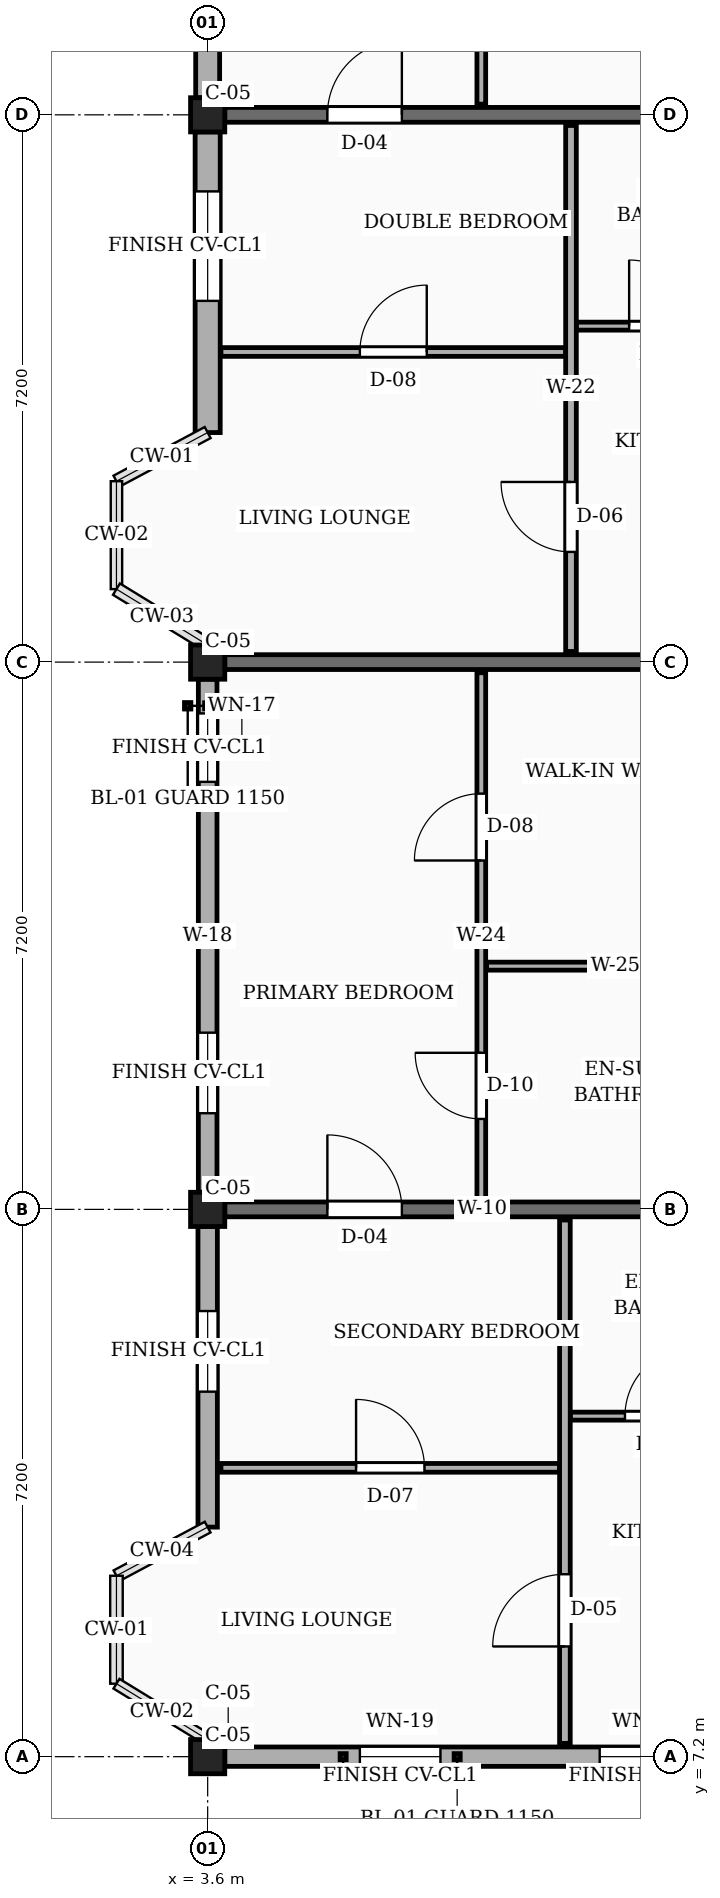
"""IFC4 building model, lengths in metres.
Left out: names, types, materials, properties, quantities, classifications, styles, units other than length and angle.
Written with IfcOpenShell. Run it as: python <this file> out.ifc"""

import sys

from ifc_helpers import new_model, si_unit, direction, frame, frame_2d, origin, origin_2d, place, context, subcontext, project, spatial, rectangle, extrude, element, fill, save


model = new_model("IFC4")
c1 = context("Model", 3, precision=1e-05, world=origin(), true_north=direction((0.0, 1.0)))
c2 = subcontext(c1, "Body", "Model", "MODEL_VIEW")
j1 = project(units=[si_unit("LENGTHUNIT", "METRE"), si_unit("PLANEANGLEUNIT", "RADIAN")], contexts=[c1])
p1 = place(None, origin())
s1 = spatial("IfcSite", under=j1, at=p1, CompositionType="ELEMENT")
p2 = place(p1, origin())
s2 = spatial("IfcBuilding", under=s1, at=p2, CompositionType="ELEMENT")
p3 = place(p2, frame((0.0, 0.0, 39.15)))
s3 = spatial("IfcBuildingStorey", under=s2, at=p3, CompositionType="ELEMENT", Elevation=39.15)
for number, where, z_axis, x_axis in (
    (1, (3.6, 7.2, 0.0), (0.0, 0.0, 1.0), (1.0, 0.0, 0.0)),
    (2, (3.6, 14.4, 0.0), (0.0, 0.0, 1.0), (1.0, 0.0, 0.0)),
    (3, (3.6, 21.6, 0.0), (0.0, 0.0, 1.0), (1.0, 0.0, 0.0)),
    (4, (3.6, 28.8, 0.0), (0.0, 0.0, 1.0), (1.0, 0.0, 0.0)),
):
    element("IfcColumn", number, at=place(p3, frame(where, z_axis=z_axis, x_axis=x_axis)), inside=s3, PredefinedType="COLUMN", context=c2, shape_type="SweptSolid", body=[
        extrude(rectangle(XDim=0.45, YDim=0.45, at=origin_2d()), origin(), (0.0, 0.0, 1.0), 3.15),
    ])
p4 = place(p3, frame((3.825, 14.4, 0.0), z_axis=(0.0, 0.0, 1.0), x_axis=(1.0, 0.0, 0.0)))
e5 = element("IfcWall", 5, at=p4, inside=s3, PredefinedType="SOLIDWALL", context=c2, shape_type="SweptSolid", body=[
    extrude(rectangle(XDim=6.775, YDim=0.195, at=frame_2d((3.388, 0.0))), origin(), (0.0, 0.0, 1.0), 2.17),
])
p5 = place(p4, frame((1.35, 0.0, 0.0)))
e6 = element("IfcOpeningElement", 6, at=p5, cuts=e5, PredefinedType="OPENING", context=c2, shape_type="SweptSolid", body=[
    extrude(rectangle(XDim=0.98, YDim=2.12, at=frame_2d((0.49, 1.06))), frame((0.0, 0.107, 0.0), z_axis=(0.0, -1.0, 0.0), x_axis=(1.0, 0.0, 0.0)), (0.0, 0.0, 1.0), 0.215),
])
p6 = place(p3, frame((3.825, 21.6, 0.0), z_axis=(0.0, 0.0, 1.0), x_axis=(1.0, 0.0, 0.0)))
e7 = element("IfcWall", 7, at=p6, inside=s3, PredefinedType="SOLIDWALL", context=c2, shape_type="SweptSolid", body=[
    extrude(rectangle(XDim=6.775, YDim=0.195, at=frame_2d((3.388, 0.0))), origin(), (0.0, 0.0, 1.0), 2.17),
])
p7 = place(p3, frame((3.825, 28.8, 0.0), z_axis=(0.0, 0.0, 1.0), x_axis=(1.0, 0.0, 0.0)))
e8 = element("IfcWall", 8, at=p7, inside=s3, PredefinedType="SOLIDWALL", context=c2, shape_type="SweptSolid", body=[
    extrude(rectangle(XDim=6.775, YDim=0.195, at=frame_2d((3.388, 0.0))), origin(), (0.0, 0.0, 1.0), 2.17),
])
p8 = place(p7, frame((1.35, 0.0, 0.0)))
e9 = element("IfcOpeningElement", 9, at=p8, cuts=e8, PredefinedType="OPENING", context=c2, shape_type="SweptSolid", body=[
    extrude(rectangle(XDim=0.98, YDim=2.12, at=frame_2d((0.49, 1.06))), frame((0.0, 0.107, 0.0), z_axis=(0.0, -1.0, 0.0), x_axis=(1.0, 0.0, 0.0)), (0.0, 0.0, 1.0), 0.215),
])
p9 = place(p3, frame((3.825, 7.2, 0.0), z_axis=(0.0, 0.0, 1.0), x_axis=(1.0, 0.0, 0.0)))
e10 = element("IfcWall", 10, at=p9, inside=s3, PredefinedType="SOLIDWALL", context=c2, shape_type="SweptSolid", body=[
    extrude(rectangle(XDim=6.75, YDim=0.255, at=frame_2d((3.375, 0.0))), origin(), (0.0, 0.0, 1.0), 2.44),
])
p10 = place(p9, frame((1.778, 0.0, 0.78)))
e11 = element("IfcOpeningElement", 11, at=p10, cuts=e10, PredefinedType="OPENING", context=c2, shape_type="SweptSolid", body=[
    extrude(rectangle(XDim=1.06, YDim=1.36, at=frame_2d((0.53, 0.68))), frame((0.0, 0.137, 0.0), z_axis=(0.0, -1.0, 0.0), x_axis=(1.0, 0.0, 0.0)), (0.0, 0.0, 1.0), 0.275),
])
p11 = place(p9, frame((4.933, 0.0, 0.78)))
e12 = element("IfcOpeningElement", 12, at=p11, cuts=e10, PredefinedType="OPENING", context=c2, shape_type="SweptSolid", body=[
    extrude(rectangle(XDim=1.22, YDim=1.36, at=frame_2d((0.61, 0.68))), frame((0.0, 0.137, 0.0), z_axis=(0.0, -1.0, 0.0), x_axis=(1.0, 0.0, 0.0)), (0.0, 0.0, 1.0), 0.275),
])
p12 = place(p3, frame((3.6, 35.775, 0.0), z_axis=(0.0, 0.0, 1.0), x_axis=(0.0, -1.0, 0.0)))
e13 = element("IfcWall", 13, at=p12, inside=s3, PredefinedType="SOLIDWALL", context=c2, shape_type="SweptSolid", body=[
    extrude(rectangle(XDim=6.75, YDim=0.315, at=frame_2d((3.375, 0.0))), origin(), (0.0, 0.0, 1.0), 2.44),
])
p13 = place(p12, frame((0.45, 0.0, 0.78)))
e14 = element("IfcOpeningElement", 14, at=p13, cuts=e13, PredefinedType="OPENING", context=c2, shape_type="SweptSolid", body=[
    extrude(rectangle(XDim=1.28, YDim=1.26, at=frame_2d((0.64, 0.63))), frame((0.0, 0.167, 0.0), z_axis=(0.0, -1.0, 0.0), x_axis=(1.0, 0.0, 0.0)), (0.0, 0.0, 1.0), 0.335),
])
p14 = place(p12, frame((4.65, 0.0, 0.78)))
e15 = element("IfcOpeningElement", 15, at=p14, cuts=e13, PredefinedType="OPENING", context=c2, shape_type="SweptSolid", body=[
    extrude(rectangle(XDim=1.44, YDim=1.26, at=frame_2d((0.72, 0.63))), frame((0.0, 0.167, 0.0), z_axis=(0.0, -1.0, 0.0), x_axis=(1.0, 0.0, 0.0)), (0.0, 0.0, 1.0), 0.335),
])
p15 = place(p3, frame((3.6, 28.575, 0.0), z_axis=(0.0, 0.0, 1.0), x_axis=(0.0, -1.0, 0.0)))
e16 = element("IfcWall", 16, at=p15, inside=s3, PredefinedType="SOLIDWALL", context=c2, shape_type="SweptSolid", body=[
    extrude(rectangle(XDim=3.955, YDim=0.33, at=frame_2d((1.978, 0.0))), origin(), (0.0, 0.0, 1.0), 2.44),
])
p16 = place(p15, frame((0.782, 0.0, 0.78)))
e17 = element("IfcOpeningElement", 17, at=p16, cuts=e16, PredefinedType="OPENING", context=c2, shape_type="SweptSolid", body=[
    extrude(rectangle(XDim=1.44, YDim=1.26, at=frame_2d((0.72, 0.63))), frame((0.0, 0.175, 0.0), z_axis=(0.0, -1.0, 0.0), x_axis=(1.0, 0.0, 0.0)), (0.0, 0.0, 1.0), 0.35),
])
p17 = place(p3, frame((3.6, 21.375, 0.0), z_axis=(0.0, 0.0, 1.0), x_axis=(0.0, -1.0, 0.0)))
e18 = element("IfcWall", 18, at=p17, inside=s3, PredefinedType="SOLIDWALL", context=c2, shape_type="SweptSolid", body=[
    extrude(rectangle(XDim=6.75, YDim=0.245, at=frame_2d((3.375, 0.0))), origin(), (0.0, 0.0, 1.0), 2.44),
])
p18 = place(p17, frame((0.45, 0.0, 0.78)))
e19 = element("IfcOpeningElement", 19, at=p18, cuts=e18, PredefinedType="OPENING", context=c2, shape_type="SweptSolid", body=[
    extrude(rectangle(XDim=0.9, YDim=1.36, at=frame_2d((0.45, 0.68))), frame((0.0, 0.133, 0.0), z_axis=(0.0, -1.0, 0.0), x_axis=(1.0, 0.0, 0.0)), (0.0, 0.0, 1.0), 0.265),
])
p19 = place(p17, frame((4.65, 0.0, 0.78)))
e20 = element("IfcOpeningElement", 20, at=p19, cuts=e18, PredefinedType="OPENING", context=c2, shape_type="SweptSolid", body=[
    extrude(rectangle(XDim=1.06, YDim=1.36, at=frame_2d((0.53, 0.68))), frame((0.0, 0.133, 0.0), z_axis=(0.0, -1.0, 0.0), x_axis=(1.0, 0.0, 0.0)), (0.0, 0.0, 1.0), 0.265),
])
p20 = place(p3, frame((3.6, 14.175, 0.0), z_axis=(0.0, 0.0, 1.0), x_axis=(0.0, -1.0, 0.0)))
e21 = element("IfcWall", 21, at=p20, inside=s3, PredefinedType="SOLIDWALL", context=c2, shape_type="SweptSolid", body=[
    extrude(rectangle(XDim=3.955, YDim=0.255, at=frame_2d((1.978, 0.0))), origin(), (0.0, 0.0, 1.0), 2.44),
])
p21 = place(p20, frame((1.113, 0.0, 0.78)))
e22 = element("IfcOpeningElement", 22, at=p21, cuts=e21, PredefinedType="OPENING", context=c2, shape_type="SweptSolid", body=[
    extrude(rectangle(XDim=1.06, YDim=1.36, at=frame_2d((0.53, 0.68))), frame((0.0, 0.137, 0.0), z_axis=(0.0, -1.0, 0.0), x_axis=(1.0, 0.0, 0.0)), (0.0, 0.0, 1.0), 0.275),
])
p22 = place(p3, frame((3.775, 11.0, 0.0), z_axis=(0.0, 0.0, 1.0), x_axis=(1.0, 0.0, 0.0)))
e23 = element("IfcWall", 23, at=p22, inside=s3, PredefinedType="PARTITIONING", context=c2, shape_type="SweptSolid", body=[
    extrude(rectangle(XDim=4.455, YDim=0.115, at=frame_2d((2.228, 0.0))), origin(), (0.0, 0.0, 1.0), 2.305),
])
p23 = place(p22, frame((1.778, 0.0, 0.0)))
e24 = element("IfcOpeningElement", 24, at=p23, cuts=e23, PredefinedType="OPENING", context=c2, shape_type="SweptSolid", body=[
    extrude(rectangle(XDim=0.9, YDim=2.1, at=frame_2d((0.45, 1.05))), frame((0.0, 0.067, 0.0), z_axis=(0.0, -1.0, 0.0), x_axis=(1.0, 0.0, 0.0)), (0.0, 0.0, 1.0), 0.135),
])
p24 = place(p3, frame((8.37, 11.68, 0.0), z_axis=(0.0, 0.0, 1.0), x_axis=(1.0, 0.0, 0.0)))
e25 = element("IfcWall", 25, at=p24, inside=s3, PredefinedType="PARTITIONING", context=c2, shape_type="SweptSolid", body=[
    extrude(rectangle(XDim=2.34, YDim=0.105, at=frame_2d((1.17, 0.0))), origin(), (0.0, 0.0, 1.0), 2.305),
])
p25 = place(p24, frame((0.72, 0.0, 0.0)))
e26 = element("IfcOpeningElement", 26, at=p25, cuts=e25, PredefinedType="OPENING", context=c2, shape_type="SweptSolid", body=[
    extrude(rectangle(XDim=0.9, YDim=2.05, at=frame_2d((0.45, 1.025))), frame((0.0, 0.062, 0.0), z_axis=(0.0, -1.0, 0.0), x_axis=(1.0, 0.0, 0.0)), (0.0, 0.0, 1.0), 0.125),
])
p26 = place(p3, frame((8.3, 7.375, 0.0), z_axis=(0.0, 0.0, 1.0), x_axis=(0.0, 1.0, 0.0)))
e27 = element("IfcWall", 27, at=p26, inside=s3, PredefinedType="PARTITIONING", context=c2, shape_type="SweptSolid", body=[
    extrude(rectangle(XDim=6.885, YDim=0.14, at=frame_2d((3.442, 0.0))), origin(), (0.0, 0.0, 1.0), 2.305),
])
p27 = place(p26, frame((1.275, 0.0, 0.0)))
e28 = element("IfcOpeningElement", 28, at=p27, cuts=e27, PredefinedType="OPENING", context=c2, shape_type="SweptSolid", body=[
    extrude(rectangle(XDim=0.95, YDim=2.1, at=frame_2d((0.475, 1.05))), frame((0.0, 0.08, 0.0), z_axis=(0.0, -1.0, 0.0), x_axis=(1.0, 0.0, 0.0)), (0.0, 0.0, 1.0), 0.16),
])
p28 = place(p3, frame((7.2, 14.54, 0.0), z_axis=(0.0, 0.0, 1.0), x_axis=(0.0, 1.0, 0.0)))
e29 = element("IfcWall", 29, at=p28, inside=s3, PredefinedType="PARTITIONING", context=c2, shape_type="SweptSolid", body=[
    extrude(rectangle(XDim=6.92, YDim=0.115, at=frame_2d((3.46, 0.0))), origin(), (0.0, 0.0, 1.0), 2.305),
])
p29 = place(p28, frame((1.05, 0.0, 0.0)))
e30 = element("IfcOpeningElement", 30, at=p29, cuts=e29, PredefinedType="OPENING", context=c2, shape_type="SweptSolid", body=[
    extrude(rectangle(XDim=0.87, YDim=2.05, at=frame_2d((0.435, 1.025))), frame((0.0, 0.067, 0.0), z_axis=(0.0, -1.0, 0.0), x_axis=(1.0, 0.0, 0.0)), (0.0, 0.0, 1.0), 0.135),
])
p30 = place(p28, frame((4.45, 0.0, 0.0)))
e31 = element("IfcOpeningElement", 31, at=p30, cuts=e29, PredefinedType="OPENING", context=c2, shape_type="SweptSolid", body=[
    extrude(rectangle(XDim=0.88, YDim=2.08, at=frame_2d((0.44, 1.04))), frame((0.0, 0.067, 0.0), z_axis=(0.0, -1.0, 0.0), x_axis=(1.0, 0.0, 0.0)), (0.0, 0.0, 1.0), 0.135),
])
p31 = place(p3, frame((7.27, 17.6, 0.0), z_axis=(0.0, 0.0, 1.0), x_axis=(1.0, 0.0, 0.0)))
e32 = element("IfcWall", 32, at=p31, inside=s3, PredefinedType="PARTITIONING", context=c2, shape_type="SweptSolid", body=[
    extrude(rectangle(XDim=3.39, YDim=0.105, at=frame_2d((1.695, 0.0))), origin(), (0.0, 0.0, 1.0), 2.305),
])
p32 = place(p3, frame((3.775, 25.68, 0.0), z_axis=(0.0, 0.0, 1.0), x_axis=(1.0, 0.0, 0.0)))
e33 = element("IfcWall", 33, at=p32, inside=s3, PredefinedType="PARTITIONING", context=c2, shape_type="SweptSolid", body=[
    extrude(rectangle(XDim=4.535, YDim=0.115, at=frame_2d((2.268, 0.0))), origin(), (0.0, 0.0, 1.0), 2.305),
])
p33 = place(p32, frame((1.827, 0.0, 0.0)))
e34 = element("IfcOpeningElement", 34, at=p33, cuts=e33, PredefinedType="OPENING", context=c2, shape_type="SweptSolid", body=[
    extrude(rectangle(XDim=0.88, YDim=2.08, at=frame_2d((0.44, 1.04))), frame((0.0, 0.067, 0.0), z_axis=(0.0, -1.0, 0.0), x_axis=(1.0, 0.0, 0.0)), (0.0, 0.0, 1.0), 0.135),
])
p34 = place(p3, frame((8.45, 26.02, 0.0), z_axis=(0.0, 0.0, 1.0), x_axis=(1.0, 0.0, 0.0)))
e35 = element("IfcWall", 35, at=p34, inside=s3, PredefinedType="PARTITIONING", context=c2, shape_type="SweptSolid", body=[
    extrude(rectangle(XDim=2.26, YDim=0.105, at=frame_2d((1.13, 0.0))), origin(), (0.0, 0.0, 1.0), 2.305),
])
p35 = place(p34, frame((0.695, 0.0, 0.0)))
e36 = element("IfcOpeningElement", 36, at=p35, cuts=e35, PredefinedType="OPENING", context=c2, shape_type="SweptSolid", body=[
    extrude(rectangle(XDim=0.87, YDim=2.05, at=frame_2d((0.435, 1.025))), frame((0.0, 0.062, 0.0), z_axis=(0.0, -1.0, 0.0), x_axis=(1.0, 0.0, 0.0)), (0.0, 0.0, 1.0), 0.125),
])
p36 = place(p3, frame((8.38, 21.74, 0.0), z_axis=(0.0, 0.0, 1.0), x_axis=(0.0, 1.0, 0.0)))
e37 = element("IfcWall", 37, at=p36, inside=s3, PredefinedType="PARTITIONING", context=c2, shape_type="SweptSolid", body=[
    extrude(rectangle(XDim=6.92, YDim=0.14, at=frame_2d((3.46, 0.0))), origin(), (0.0, 0.0, 1.0), 2.305),
])
p37 = place(p36, frame((1.31, 0.0, 0.0)))
e38 = element("IfcOpeningElement", 38, at=p37, cuts=e37, PredefinedType="OPENING", context=c2, shape_type="SweptSolid", body=[
    extrude(rectangle(XDim=0.92, YDim=2.1, at=frame_2d((0.46, 1.05))), frame((0.0, 0.08, 0.0), z_axis=(0.0, -1.0, 0.0), x_axis=(1.0, 0.0, 0.0)), (0.0, 0.0, 1.0), 0.16),
])
p38 = place(p3, frame((7.2, 28.94, 0.0), z_axis=(0.0, 0.0, 1.0), x_axis=(0.0, 1.0, 0.0)))
e39 = element("IfcWall", 39, at=p38, inside=s3, PredefinedType="PARTITIONING", context=c2, shape_type="SweptSolid", body=[
    extrude(rectangle(XDim=6.92, YDim=0.115, at=frame_2d((3.46, 0.0))), origin(), (0.0, 0.0, 1.0), 2.305),
])
p39 = place(p38, frame((1.05, 0.0, 0.0)))
e40 = element("IfcOpeningElement", 40, at=p39, cuts=e39, PredefinedType="OPENING", context=c2, shape_type="SweptSolid", body=[
    extrude(rectangle(XDim=0.87, YDim=2.05, at=frame_2d((0.435, 1.025))), frame((0.0, 0.067, 0.0), z_axis=(0.0, -1.0, 0.0), x_axis=(1.0, 0.0, 0.0)), (0.0, 0.0, 1.0), 0.135),
])
p40 = place(p38, frame((4.45, 0.0, 0.0)))
e41 = element("IfcOpeningElement", 41, at=p40, cuts=e39, PredefinedType="OPENING", context=c2, shape_type="SweptSolid", body=[
    extrude(rectangle(XDim=0.88, YDim=2.08, at=frame_2d((0.44, 1.04))), frame((0.0, 0.067, 0.0), z_axis=(0.0, -1.0, 0.0), x_axis=(1.0, 0.0, 0.0)), (0.0, 0.0, 1.0), 0.135),
])
p41 = place(p10, origin())
e42 = element("IfcWindow", 42, at=p41, inside=s3, PartitioningType="SINGLE_PANEL", PredefinedType="WINDOW", context=c2, shape_type="SweptSolid", body=[
    extrude(rectangle(XDim=1.06, YDim=1.36, at=frame_2d((0.53, 0.68))), frame((0.0, 0.03, 0.0), z_axis=(0.0, -1.0, 0.0), x_axis=(1.0, 0.0, 0.0)), (0.0, 0.0, 1.0), 0.06),
])
fill(e11, e42)
p42 = place(p11, origin())
e43 = element("IfcWindow", 43, at=p42, inside=s3, PartitioningType="SINGLE_PANEL", PredefinedType="WINDOW", context=c2, shape_type="SweptSolid", body=[
    extrude(rectangle(XDim=1.22, YDim=1.36, at=frame_2d((0.61, 0.68))), frame((0.0, 0.03, 0.0), z_axis=(0.0, -1.0, 0.0), x_axis=(1.0, 0.0, 0.0)), (0.0, 0.0, 1.0), 0.06),
])
fill(e12, e43)
p43 = place(p16, origin())
e44 = element("IfcWindow", 44, at=p43, inside=s3, PartitioningType="SINGLE_PANEL", PredefinedType="WINDOW", context=c2, shape_type="SweptSolid", body=[
    extrude(rectangle(XDim=1.44, YDim=1.26, at=frame_2d((0.72, 0.63))), frame((0.0, 0.03, 0.0), z_axis=(0.0, -1.0, 0.0), x_axis=(1.0, 0.0, 0.0)), (0.0, 0.0, 1.0), 0.06),
])
fill(e17, e44)
p44 = place(p18, origin())
e45 = element("IfcWindow", 45, at=p44, inside=s3, PartitioningType="SINGLE_PANEL", PredefinedType="WINDOW", context=c2, shape_type="SweptSolid", body=[
    extrude(rectangle(XDim=0.9, YDim=1.36, at=frame_2d((0.45, 0.68))), frame((0.0, 0.03, 0.0), z_axis=(0.0, -1.0, 0.0), x_axis=(1.0, 0.0, 0.0)), (0.0, 0.0, 1.0), 0.06),
])
fill(e19, e45)
p45 = place(p19, origin())
e46 = element("IfcWindow", 46, at=p45, inside=s3, PartitioningType="SINGLE_PANEL", PredefinedType="WINDOW", context=c2, shape_type="SweptSolid", body=[
    extrude(rectangle(XDim=1.06, YDim=1.36, at=frame_2d((0.53, 0.68))), frame((0.0, 0.03, 0.0), z_axis=(0.0, -1.0, 0.0), x_axis=(1.0, 0.0, 0.0)), (0.0, 0.0, 1.0), 0.06),
])
fill(e20, e46)
p46 = place(p21, origin())
e47 = element("IfcWindow", 47, at=p46, inside=s3, PartitioningType="SINGLE_PANEL", PredefinedType="WINDOW", context=c2, shape_type="SweptSolid", body=[
    extrude(rectangle(XDim=1.06, YDim=1.36, at=frame_2d((0.53, 0.68))), frame((0.0, 0.03, 0.0), z_axis=(0.0, -1.0, 0.0), x_axis=(1.0, 0.0, 0.0)), (0.0, 0.0, 1.0), 0.06),
])
fill(e22, e47)
p47 = place(p23, origin())
e48 = element("IfcDoor", 48, at=p47, inside=s3, OperationType="SINGLE_SWING_LEFT", PredefinedType="DOOR", context=c2, shape_type="SweptSolid", body=[
    extrude(rectangle(XDim=0.9, YDim=2.1, at=frame_2d((0.45, 1.05))), frame((0.0, 0.025, 0.0), z_axis=(0.0, -1.0, 0.0), x_axis=(1.0, 0.0, 0.0)), (0.0, 0.0, 1.0), 0.05),
])
fill(e24, e48)
p48 = place(p25, origin())
e49 = element("IfcDoor", 49, at=p48, inside=s3, OperationType="SINGLE_SWING_RIGHT", PredefinedType="DOOR", context=c2, shape_type="SweptSolid", body=[
    extrude(rectangle(XDim=0.9, YDim=2.05, at=frame_2d((0.45, 1.025))), frame((0.0, 0.025, 0.0), z_axis=(0.0, -1.0, 0.0), x_axis=(1.0, 0.0, 0.0)), (0.0, 0.0, 1.0), 0.05),
])
fill(e26, e49)
p49 = place(p27, origin())
e50 = element("IfcDoor", 50, at=p49, inside=s3, OperationType="SINGLE_SWING_LEFT", PredefinedType="DOOR", context=c2, shape_type="SweptSolid", body=[
    extrude(rectangle(XDim=0.95, YDim=2.1, at=frame_2d((0.475, 1.05))), frame((0.0, 0.025, 0.0), z_axis=(0.0, -1.0, 0.0), x_axis=(1.0, 0.0, 0.0)), (0.0, 0.0, 1.0), 0.05),
])
fill(e28, e50)
p50 = place(p29, origin())
e51 = element("IfcDoor", 51, at=p50, inside=s3, OperationType="SINGLE_SWING_RIGHT", PredefinedType="DOOR", context=c2, shape_type="SweptSolid", body=[
    extrude(rectangle(XDim=0.87, YDim=2.05, at=frame_2d((0.435, 1.025))), frame((0.0, 0.025, 0.0), z_axis=(0.0, -1.0, 0.0), x_axis=(1.0, 0.0, 0.0)), (0.0, 0.0, 1.0), 0.05),
])
fill(e30, e51)
p51 = place(p30, origin())
e52 = element("IfcDoor", 52, at=p51, inside=s3, OperationType="SINGLE_SWING_LEFT", PredefinedType="DOOR", context=c2, shape_type="SweptSolid", body=[
    extrude(rectangle(XDim=0.88, YDim=2.08, at=frame_2d((0.44, 1.04))), frame((0.0, 0.025, 0.0), z_axis=(0.0, -1.0, 0.0), x_axis=(1.0, 0.0, 0.0)), (0.0, 0.0, 1.0), 0.05),
])
fill(e31, e52)
p52 = place(p33, origin())
e53 = element("IfcDoor", 53, at=p52, inside=s3, OperationType="SINGLE_SWING_RIGHT", PredefinedType="DOOR", context=c2, shape_type="SweptSolid", body=[
    extrude(rectangle(XDim=0.88, YDim=2.08, at=frame_2d((0.44, 1.04))), frame((0.0, 0.025, 0.0), z_axis=(0.0, -1.0, 0.0), x_axis=(1.0, 0.0, 0.0)), (0.0, 0.0, 1.0), 0.05),
])
fill(e34, e53)
p53 = place(p35, origin())
e54 = element("IfcDoor", 54, at=p53, inside=s3, OperationType="SINGLE_SWING_LEFT", PredefinedType="DOOR", context=c2, shape_type="SweptSolid", body=[
    extrude(rectangle(XDim=0.87, YDim=2.05, at=frame_2d((0.435, 1.025))), frame((0.0, 0.025, 0.0), z_axis=(0.0, -1.0, 0.0), x_axis=(1.0, 0.0, 0.0)), (0.0, 0.0, 1.0), 0.05),
])
fill(e36, e54)
p54 = place(p37, origin())
e55 = element("IfcDoor", 55, at=p54, inside=s3, OperationType="SINGLE_SWING_RIGHT", PredefinedType="DOOR", context=c2, shape_type="SweptSolid", body=[
    extrude(rectangle(XDim=0.92, YDim=2.1, at=frame_2d((0.46, 1.05))), frame((0.0, 0.025, 0.0), z_axis=(0.0, -1.0, 0.0), x_axis=(1.0, 0.0, 0.0)), (0.0, 0.0, 1.0), 0.05),
])
fill(e38, e55)
p55 = place(p5, origin())
e56 = element("IfcDoor", 56, at=p55, inside=s3, OperationType="SINGLE_SWING_LEFT", PredefinedType="DOOR", context=c2, shape_type="SweptSolid", body=[
    extrude(rectangle(XDim=0.98, YDim=2.12, at=frame_2d((0.49, 1.06))), frame((0.0, 0.025, 0.0), z_axis=(0.0, -1.0, 0.0), x_axis=(1.0, 0.0, 0.0)), (0.0, 0.0, 1.0), 0.05),
])
fill(e6, e56)
p56 = place(p8, origin())
e57 = element("IfcDoor", 57, at=p56, inside=s3, OperationType="SINGLE_SWING_RIGHT", PredefinedType="DOOR", context=c2, shape_type="SweptSolid", body=[
    extrude(rectangle(XDim=0.98, YDim=2.12, at=frame_2d((0.49, 1.06))), frame((0.0, 0.025, 0.0), z_axis=(0.0, -1.0, 0.0), x_axis=(1.0, 0.0, 0.0)), (0.0, 0.0, 1.0), 0.05),
])
fill(e9, e57)
save(model, sys.argv[1])
